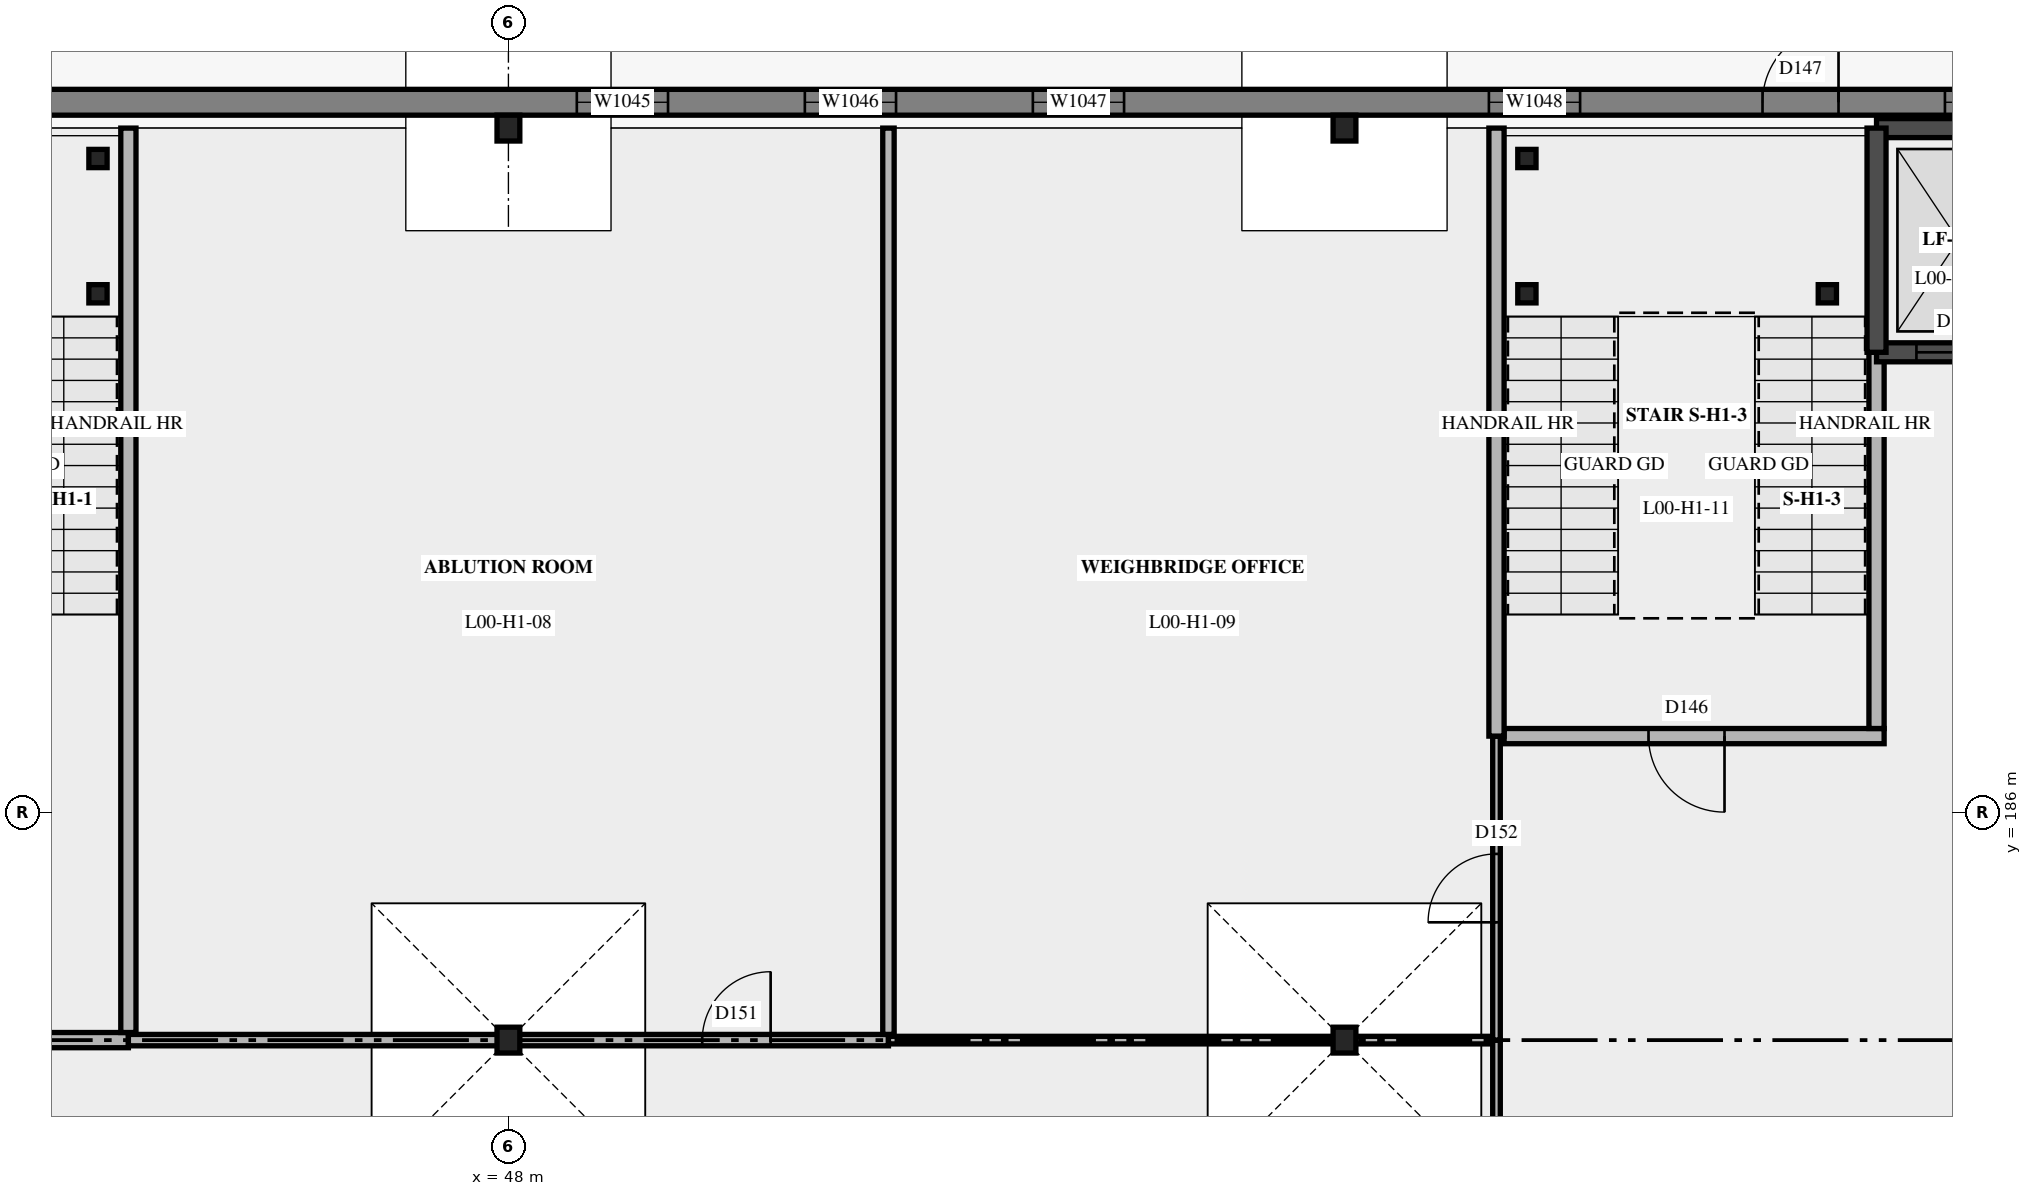
"""IFC4 building model, lengths in metres.
Left out: names, types, materials, properties, quantities, classifications, styles, units other than length and angle.
Written with IfcOpenShell. Run it as: python <this file> out.ifc"""

import sys

from ifc_helpers import new_model, si_unit, direction, frame, frame_2d, origin, origin_2d, place, context, subcontext, project, spatial, rectangle, i_section, extrude, element, fill, save


model = new_model("IFC4")
c1 = context("Model", 3, precision=1e-05, world=origin(), true_north=direction((0.0, 1.0)))
c2 = subcontext(c1, "Body", "Model", "MODEL_VIEW")
j1 = project(units=[si_unit("LENGTHUNIT", "METRE"), si_unit("PLANEANGLEUNIT", "RADIAN")], contexts=[c1])
p1 = place(None, origin())
s1 = spatial("IfcSite", under=j1, at=p1, CompositionType="ELEMENT")
p2 = place(p1, origin())
s2 = spatial("IfcBuilding", under=s1, at=p2, CompositionType="ELEMENT")
p3 = place(p2, origin())
s3 = spatial("IfcBuildingStorey", under=s2, at=p3, CompositionType="ELEMENT", Elevation=0.0)
for number, where, z_axis, x_axis in (
    (1, (48.0, 183.0, 0.0), (0.0, 0.0, 1.0), (1.0, 0.0, 0.0)),
    (2, (48.0, 195.0, 0.0), (0.0, 0.0, 1.0), (1.0, 0.0, 0.0)),
    (3, (59.0, 183.0, 0.0), (0.0, 0.0, 1.0), (1.0, 0.0, 0.0)),
    (4, (59.0, 195.0, 0.0), (0.0, 0.0, 1.0), (1.0, 0.0, 0.0)),
):
    element("IfcColumn", number, at=place(p3, frame(where, z_axis=z_axis, x_axis=x_axis)), inside=s3, PredefinedType="COLUMN", context=c2, shape_type="SweptSolid", body=[
        extrude(i_section(OverallWidth=0.3, OverallDepth=0.34, WebThickness=0.012, FlangeThickness=0.021, at=origin_2d()), origin(), (0.0, 0.0, 1.0), 4.65),
    ])
p4 = place(p3, frame((30.0, 195.34, 0.0), z_axis=(0.0, 0.0, 1.0), x_axis=(1.0, 0.0, 0.0)))
e5 = element("IfcWall", 5, at=p4, inside=s3, PredefinedType="SOLIDWALL", context=c2, shape_type="SweptSolid", body=[
    extrude(rectangle(XDim=80.0, YDim=0.34, at=frame_2d((40.0, 0.0))), origin(), (0.0, 0.0, 1.0), 5.4),
])
p5 = place(p4, frame((42.5, 0.0, 0.0)))
e6 = element("IfcOpeningElement", 6, at=p5, cuts=e5, PredefinedType="OPENING", context=c2, shape_type="SweptSolid", body=[
    extrude(rectangle(XDim=1.8, YDim=2.1, at=frame_2d((0.9, 1.05))), frame((0.0, 0.18, 0.0), z_axis=(0.0, -1.0, 0.0), x_axis=(1.0, 0.0, 0.0)), (0.0, 0.0, 1.0), 0.36),
])
p6 = place(p4, frame((34.5, 0.0, 0.0)))
e7 = element("IfcOpeningElement", 7, at=p6, cuts=e5, PredefinedType="OPENING", context=c2, shape_type="SweptSolid", body=[
    extrude(rectangle(XDim=1.0, YDim=2.1, at=frame_2d((0.5, 1.05))), frame((0.0, 0.18, 0.0), z_axis=(0.0, -1.0, 0.0), x_axis=(1.0, 0.0, 0.0)), (0.0, 0.0, 1.0), 0.36),
])
p7 = place(p4, frame((68.5, 0.0, 0.0)))
e8 = element("IfcOpeningElement", 8, at=p7, cuts=e5, PredefinedType="OPENING", context=c2, shape_type="SweptSolid", body=[
    extrude(rectangle(XDim=1.0, YDim=2.1, at=frame_2d((0.5, 1.05))), frame((0.0, 0.18, 0.0), z_axis=(0.0, -1.0, 0.0), x_axis=(1.0, 0.0, 0.0)), (0.0, 0.0, 1.0), 0.36),
])
p8 = place(p4, frame((0.9, 0.0, 0.9)))
e9 = element("IfcOpeningElement", 9, at=p8, cuts=e5, PredefinedType="OPENING", context=c2, shape_type="SweptSolid", body=[
    extrude(rectangle(XDim=1.2, YDim=3.3, at=frame_2d((0.6, 1.65))), frame((0.0, 0.18, 0.0), z_axis=(0.0, -1.0, 0.0), x_axis=(1.0, 0.0, 0.0)), (0.0, 0.0, 1.0), 0.36),
])
p9 = place(p4, frame((3.9, 0.0, 0.9)))
e10 = element("IfcOpeningElement", 10, at=p9, cuts=e5, PredefinedType="OPENING", context=c2, shape_type="SweptSolid", body=[
    extrude(rectangle(XDim=1.2, YDim=3.3, at=frame_2d((0.6, 1.65))), frame((0.0, 0.18, 0.0), z_axis=(0.0, -1.0, 0.0), x_axis=(1.0, 0.0, 0.0)), (0.0, 0.0, 1.0), 0.36),
])
p10 = place(p4, frame((18.9, 0.0, 0.9)))
e11 = element("IfcOpeningElement", 11, at=p10, cuts=e5, PredefinedType="OPENING", context=c2, shape_type="SweptSolid", body=[
    extrude(rectangle(XDim=1.2, YDim=3.3, at=frame_2d((0.6, 1.65))), frame((0.0, 0.18, 0.0), z_axis=(0.0, -1.0, 0.0), x_axis=(1.0, 0.0, 0.0)), (0.0, 0.0, 1.0), 0.36),
])
p11 = place(p4, frame((21.9, 0.0, 0.9)))
e12 = element("IfcOpeningElement", 12, at=p11, cuts=e5, PredefinedType="OPENING", context=c2, shape_type="SweptSolid", body=[
    extrude(rectangle(XDim=1.2, YDim=3.3, at=frame_2d((0.6, 1.65))), frame((0.0, 0.18, 0.0), z_axis=(0.0, -1.0, 0.0), x_axis=(1.0, 0.0, 0.0)), (0.0, 0.0, 1.0), 0.36),
])
p12 = place(p4, frame((24.9, 0.0, 0.9)))
e13 = element("IfcOpeningElement", 13, at=p12, cuts=e5, PredefinedType="OPENING", context=c2, shape_type="SweptSolid", body=[
    extrude(rectangle(XDim=1.2, YDim=3.3, at=frame_2d((0.6, 1.65))), frame((0.0, 0.18, 0.0), z_axis=(0.0, -1.0, 0.0), x_axis=(1.0, 0.0, 0.0)), (0.0, 0.0, 1.0), 0.36),
])
p13 = place(p4, frame((30.9, 0.0, 0.9)))
e14 = element("IfcOpeningElement", 14, at=p13, cuts=e5, PredefinedType="OPENING", context=c2, shape_type="SweptSolid", body=[
    extrude(rectangle(XDim=1.2, YDim=3.3, at=frame_2d((0.6, 1.65))), frame((0.0, 0.18, 0.0), z_axis=(0.0, -1.0, 0.0), x_axis=(1.0, 0.0, 0.0)), (0.0, 0.0, 1.0), 0.36),
])
p14 = place(p4, frame((36.9, 0.0, 0.9)))
e15 = element("IfcOpeningElement", 15, at=p14, cuts=e5, PredefinedType="OPENING", context=c2, shape_type="SweptSolid", body=[
    extrude(rectangle(XDim=1.2, YDim=3.3, at=frame_2d((0.6, 1.65))), frame((0.0, 0.18, 0.0), z_axis=(0.0, -1.0, 0.0), x_axis=(1.0, 0.0, 0.0)), (0.0, 0.0, 1.0), 0.36),
])
p15 = place(p4, frame((45.9, 0.0, 0.9)))
e16 = element("IfcOpeningElement", 16, at=p15, cuts=e5, PredefinedType="OPENING", context=c2, shape_type="SweptSolid", body=[
    extrude(rectangle(XDim=1.2, YDim=3.3, at=frame_2d((0.6, 1.65))), frame((0.0, 0.18, 0.0), z_axis=(0.0, -1.0, 0.0), x_axis=(1.0, 0.0, 0.0)), (0.0, 0.0, 1.0), 0.36),
])
p16 = place(p4, frame((48.9, 0.0, 0.9)))
e17 = element("IfcOpeningElement", 17, at=p16, cuts=e5, PredefinedType="OPENING", context=c2, shape_type="SweptSolid", body=[
    extrude(rectangle(XDim=1.2, YDim=3.3, at=frame_2d((0.6, 1.65))), frame((0.0, 0.18, 0.0), z_axis=(0.0, -1.0, 0.0), x_axis=(1.0, 0.0, 0.0)), (0.0, 0.0, 1.0), 0.36),
])
p17 = place(p4, frame((51.9, 0.0, 0.9)))
e18 = element("IfcOpeningElement", 18, at=p17, cuts=e5, PredefinedType="OPENING", context=c2, shape_type="SweptSolid", body=[
    extrude(rectangle(XDim=1.2, YDim=3.3, at=frame_2d((0.6, 1.65))), frame((0.0, 0.18, 0.0), z_axis=(0.0, -1.0, 0.0), x_axis=(1.0, 0.0, 0.0)), (0.0, 0.0, 1.0), 0.36),
])
p18 = place(p4, frame((54.9, 0.0, 0.9)))
e19 = element("IfcOpeningElement", 19, at=p18, cuts=e5, PredefinedType="OPENING", context=c2, shape_type="SweptSolid", body=[
    extrude(rectangle(XDim=1.2, YDim=3.3, at=frame_2d((0.6, 1.65))), frame((0.0, 0.18, 0.0), z_axis=(0.0, -1.0, 0.0), x_axis=(1.0, 0.0, 0.0)), (0.0, 0.0, 1.0), 0.36),
])
p19 = place(p4, frame((57.9, 0.0, 0.9)))
e20 = element("IfcOpeningElement", 20, at=p19, cuts=e5, PredefinedType="OPENING", context=c2, shape_type="SweptSolid", body=[
    extrude(rectangle(XDim=1.2, YDim=3.3, at=frame_2d((0.6, 1.65))), frame((0.0, 0.18, 0.0), z_axis=(0.0, -1.0, 0.0), x_axis=(1.0, 0.0, 0.0)), (0.0, 0.0, 1.0), 0.36),
])
p20 = place(p4, frame((75.9, 0.0, 0.9)))
e21 = element("IfcOpeningElement", 21, at=p20, cuts=e5, PredefinedType="OPENING", context=c2, shape_type="SweptSolid", body=[
    extrude(rectangle(XDim=1.2, YDim=3.3, at=frame_2d((0.6, 1.65))), frame((0.0, 0.18, 0.0), z_axis=(0.0, -1.0, 0.0), x_axis=(1.0, 0.0, 0.0)), (0.0, 0.0, 1.0), 0.36),
])
p21 = place(p3, frame((37.0, 183.0, 0.0), z_axis=(0.0, 0.0, 1.0), x_axis=(1.0, 0.0, 0.0)))
e22 = element("IfcWall", 22, at=p21, inside=s3, PredefinedType="PARTITIONING", context=c2, shape_type="SweptSolid", body=[
    extrude(rectangle(XDim=6.0, YDim=0.2, at=frame_2d((3.0, 0.0))), origin(), (0.0, 0.0, 1.0), 4.65),
])
p22 = place(p21, frame((2.5, 0.0, 0.0)))
e23 = element("IfcOpeningElement", 23, at=p22, cuts=e22, PredefinedType="OPENING", context=c2, shape_type="SweptSolid", body=[
    extrude(rectangle(XDim=1.0, YDim=2.1, at=frame_2d((0.5, 1.05))), frame((0.0, 0.11, 0.0), z_axis=(0.0, -1.0, 0.0), x_axis=(1.0, 0.0, 0.0)), (0.0, 0.0, 1.0), 0.22),
])
p23 = place(p3, frame((43.0, 183.0, 0.0), z_axis=(0.0, 0.0, 1.0), x_axis=(1.0, 0.0, 0.0)))
e24 = element("IfcWall", 24, at=p23, inside=s3, PredefinedType="PARTITIONING", context=c2, shape_type="SweptSolid", body=[
    extrude(rectangle(XDim=10.0, YDim=0.15, at=frame_2d((5.0, 0.0))), origin(), (0.0, 0.0, 1.0), 4.65),
])
p24 = place(p23, frame((7.55, 0.0, 0.0)))
e25 = element("IfcOpeningElement", 25, at=p24, cuts=e24, PredefinedType="OPENING", context=c2, shape_type="SweptSolid", body=[
    extrude(rectangle(XDim=0.9, YDim=2.1, at=frame_2d((0.45, 1.05))), frame((0.0, 0.085, 0.0), z_axis=(0.0, -1.0, 0.0), x_axis=(1.0, 0.0, 0.0)), (0.0, 0.0, 1.0), 0.17),
])
p25 = place(p3, frame((53.0, 183.0, 0.0), z_axis=(0.0, 0.0, 1.0), x_axis=(1.0, 0.0, 0.0)))
e26 = element("IfcWall", 26, at=p25, inside=s3, PredefinedType="PARTITIONING", context=c2, shape_type="SweptSolid", body=[
    extrude(rectangle(XDim=7.95, YDim=0.1, at=frame_2d((3.975, 0.0))), origin(), (0.0, 0.0, 1.0), 4.65),
])
p26 = place(p3, frame((61.1, 187.0, 0.0), z_axis=(0.0, 0.0, 1.0), x_axis=(1.0, 0.0, 0.0)))
e27 = element("IfcWall", 27, at=p26, inside=s3, PredefinedType="PARTITIONING", context=c2, shape_type="SweptSolid", body=[
    extrude(rectangle(XDim=5.0, YDim=0.2, at=frame_2d((2.5, 0.0))), origin(), (0.0, 0.0, 1.0), 5.15),
])
p27 = place(p26, frame((1.9, 0.0, 0.0)))
e28 = element("IfcOpeningElement", 28, at=p27, cuts=e27, PredefinedType="OPENING", context=c2, shape_type="SweptSolid", body=[
    extrude(rectangle(XDim=1.0, YDim=2.1, at=frame_2d((0.5, 1.05))), frame((0.0, 0.11, 0.0), z_axis=(0.0, -1.0, 0.0), x_axis=(1.0, 0.0, 0.0)), (0.0, 0.0, 1.0), 0.22),
])
p28 = place(p3, frame((43.0, 183.1, 0.0), z_axis=(0.0, 0.0, 1.0), x_axis=(0.0, 1.0, 0.0)))
e29 = element("IfcWall", 29, at=p28, inside=s3, PredefinedType="PARTITIONING", context=c2, shape_type="SweptSolid", body=[
    extrude(rectangle(XDim=11.9, YDim=0.2, at=frame_2d((5.95, 0.0))), origin(), (0.0, 0.0, 1.0), 5.15),
])
p29 = place(p3, frame((53.0, 183.075, 0.0), z_axis=(0.0, 0.0, 1.0), x_axis=(0.0, 1.0, 0.0)))
e30 = element("IfcWall", 30, at=p29, inside=s3, PredefinedType="PARTITIONING", context=c2, shape_type="SweptSolid", body=[
    extrude(rectangle(XDim=11.925, YDim=0.15, at=frame_2d((5.962, 0.0))), origin(), (0.0, 0.0, 1.0), 5.15),
])
p30 = place(p3, frame((61.0, 171.075, 0.0), z_axis=(0.0, 0.0, 1.0), x_axis=(0.0, 1.0, 0.0)))
e31 = element("IfcWall", 31, at=p30, inside=s3, PredefinedType="PARTITIONING", context=c2, shape_type="SweptSolid", body=[
    extrude(rectangle(XDim=11.925, YDim=0.1, at=frame_2d((5.962, 0.0))), origin(), (0.0, 0.0, 1.0), 5.15),
])
p31 = place(p30, frame((5.025, 0.0, 0.0)))
e32 = element("IfcOpeningElement", 32, at=p31, cuts=e31, PredefinedType="OPENING", context=c2, shape_type="SweptSolid", body=[
    extrude(rectangle(XDim=1.8, YDim=2.1, at=frame_2d((0.9, 1.05))), frame((0.0, 0.06, 0.0), z_axis=(0.0, -1.0, 0.0), x_axis=(1.0, 0.0, 0.0)), (0.0, 0.0, 1.0), 0.12),
])
p32 = place(p3, frame((61.0, 183.0, 0.0), z_axis=(0.0, 0.0, 1.0), x_axis=(0.0, 1.0, 0.0)))
e33 = element("IfcWall", 33, at=p32, inside=s3, PredefinedType="PARTITIONING", context=c2, shape_type="SweptSolid", body=[
    extrude(rectangle(XDim=4.0, YDim=0.1, at=frame_2d((2.0, 0.0))), origin(), (0.0, 0.0, 1.0), 5.15),
])
p33 = place(p32, frame((1.55, 0.0, 0.0)))
e34 = element("IfcOpeningElement", 34, at=p33, cuts=e33, PredefinedType="OPENING", context=c2, shape_type="SweptSolid", body=[
    extrude(rectangle(XDim=0.9, YDim=2.1, at=frame_2d((0.45, 1.05))), frame((0.0, 0.06, 0.0), z_axis=(0.0, -1.0, 0.0), x_axis=(1.0, 0.0, 0.0)), (0.0, 0.0, 1.0), 0.12),
])
p34 = place(p3, frame((61.0, 187.0, 0.0), z_axis=(0.0, 0.0, 1.0), x_axis=(0.0, 1.0, 0.0)))
e35 = element("IfcWall", 35, at=p34, inside=s3, PredefinedType="PARTITIONING", context=c2, shape_type="SweptSolid", body=[
    extrude(rectangle(XDim=8.0, YDim=0.2, at=frame_2d((4.0, 0.0))), origin(), (0.0, 0.0, 1.0), 5.15),
])
p35 = place(p3, frame((66.0, 187.1, 0.0), z_axis=(0.0, 0.0, 1.0), x_axis=(0.0, 1.0, 0.0)))
e36 = element("IfcWall", 36, at=p35, inside=s3, PredefinedType="PARTITIONING", context=c2, shape_type="SweptSolid", body=[
    extrude(rectangle(XDim=4.95, YDim=0.2, at=frame_2d((2.475, 0.0))), origin(), (0.0, 0.0, 1.0), 4.75),
])
p36 = place(p3, frame((68.15, 195.0, -1.4), z_axis=(0.0, 0.0, 1.0), x_axis=(-1.0, 0.0, 0.0)))
e37 = element("IfcWall", 37, at=p36, inside=s3, PredefinedType="SHEAR", context=c2, shape_type="SweptSolid", body=[
    extrude(rectangle(XDim=2.15, YDim=0.25, at=frame_2d((1.075, 0.0))), origin(), (0.0, 0.0, 1.0), 6.8),
])
p37 = place(p3, frame((66.0, 192.05, -1.4), z_axis=(0.0, 0.0, 1.0), x_axis=(1.0, 0.0, 0.0)))
e38 = element("IfcWall", 38, at=p37, inside=s3, PredefinedType="SHEAR", context=c2, shape_type="SweptSolid", body=[
    extrude(rectangle(XDim=2.15, YDim=0.25, at=frame_2d((1.075, 0.0))), origin(), (0.0, 0.0, 1.0), 6.8),
])
p38 = place(p37, frame((0.525, 0.0, 1.4)))
e39 = element("IfcOpeningElement", 39, at=p38, cuts=e38, PredefinedType="OPENING", context=c2, shape_type="SweptSolid", body=[
    extrude(rectangle(XDim=1.1, YDim=2.1, at=frame_2d((0.55, 1.05))), frame((0.0, 0.135, 0.0), z_axis=(0.0, -1.0, 0.0), x_axis=(1.0, 0.0, 0.0)), (0.0, 0.0, 1.0), 0.27),
])
p39 = place(p3, frame((66.0, 195.0, -1.4), z_axis=(0.0, 0.0, 1.0), x_axis=(0.0, -1.0, 0.0)))
e40 = element("IfcWall", 40, at=p39, inside=s3, PredefinedType="SHEAR", context=c2, shape_type="SweptSolid", body=[
    extrude(rectangle(XDim=2.95, YDim=0.25, at=frame_2d((1.475, 0.0))), origin(), (0.0, 0.0, 1.0), 6.8),
])
for number, where, z_axis, x_axis in (
    (41, (42.6, 192.82, 0.0), (0.0, 0.0, 1.0), (1.0, 0.0, 0.0)),
    (42, (42.6, 194.6, 0.0), (0.0, 0.0, 1.0), (1.0, 0.0, 0.0)),
    (43, (61.4, 192.82, 0.0), (0.0, 0.0, 1.0), (1.0, 0.0, 0.0)),
    (44, (61.4, 194.6, 0.0), (0.0, 0.0, 1.0), (1.0, 0.0, 0.0)),
    (45, (65.353, 192.82, 0.0), (0.0, 0.0, 1.0), (1.0, 0.0, 0.0)),
):
    element("IfcColumn", number, at=place(p3, frame(where, z_axis=z_axis, x_axis=x_axis)), inside=s3, PredefinedType="COLUMN", context=c2, shape_type="SweptSolid", body=[
        extrude(i_section(OverallWidth=0.24, OverallDepth=0.24, WebThickness=0.01, FlangeThickness=0.017, at=origin_2d()), origin(), (0.0, 0.0, 1.0), 2.5),
    ])
p40 = place(p6, origin())
e46 = element("IfcDoor", 46, at=p40, inside=s3, OperationType="SINGLE_SWING_RIGHT", PredefinedType="DOOR", context=c2, shape_type="SweptSolid", body=[
    extrude(rectangle(XDim=1.0, YDim=2.1, at=frame_2d((0.5, 1.05))), frame((0.0, 0.025, 0.0), z_axis=(0.0, -1.0, 0.0), x_axis=(1.0, 0.0, 0.0)), (0.0, 0.0, 1.0), 0.05),
])
fill(e7, e46)
p41 = place(p10, origin())
e47 = element("IfcWindow", 47, at=p41, inside=s3, PartitioningType="SINGLE_PANEL", PredefinedType="WINDOW", context=c2, shape_type="SweptSolid", body=[
    extrude(rectangle(XDim=1.2, YDim=3.3, at=frame_2d((0.6, 1.65))), frame((0.0, 0.03, 0.0), z_axis=(0.0, -1.0, 0.0), x_axis=(1.0, 0.0, 0.0)), (0.0, 0.0, 1.0), 0.06),
])
fill(e11, e47)
p42 = place(p11, origin())
e48 = element("IfcWindow", 48, at=p42, inside=s3, PartitioningType="SINGLE_PANEL", PredefinedType="WINDOW", context=c2, shape_type="SweptSolid", body=[
    extrude(rectangle(XDim=1.2, YDim=3.3, at=frame_2d((0.6, 1.65))), frame((0.0, 0.03, 0.0), z_axis=(0.0, -1.0, 0.0), x_axis=(1.0, 0.0, 0.0)), (0.0, 0.0, 1.0), 0.06),
])
fill(e12, e48)
p43 = place(p12, origin())
e49 = element("IfcWindow", 49, at=p43, inside=s3, PartitioningType="SINGLE_PANEL", PredefinedType="WINDOW", context=c2, shape_type="SweptSolid", body=[
    extrude(rectangle(XDim=1.2, YDim=3.3, at=frame_2d((0.6, 1.65))), frame((0.0, 0.03, 0.0), z_axis=(0.0, -1.0, 0.0), x_axis=(1.0, 0.0, 0.0)), (0.0, 0.0, 1.0), 0.06),
])
fill(e13, e49)
p44 = place(p13, origin())
e50 = element("IfcWindow", 50, at=p44, inside=s3, PartitioningType="SINGLE_PANEL", PredefinedType="WINDOW", context=c2, shape_type="SweptSolid", body=[
    extrude(rectangle(XDim=1.2, YDim=3.3, at=frame_2d((0.6, 1.65))), frame((0.0, 0.03, 0.0), z_axis=(0.0, -1.0, 0.0), x_axis=(1.0, 0.0, 0.0)), (0.0, 0.0, 1.0), 0.06),
])
fill(e14, e50)
p45 = place(p14, origin())
e51 = element("IfcWindow", 51, at=p45, inside=s3, PartitioningType="SINGLE_PANEL", PredefinedType="WINDOW", context=c2, shape_type="SweptSolid", body=[
    extrude(rectangle(XDim=1.2, YDim=3.3, at=frame_2d((0.6, 1.65))), frame((0.0, 0.03, 0.0), z_axis=(0.0, -1.0, 0.0), x_axis=(1.0, 0.0, 0.0)), (0.0, 0.0, 1.0), 0.06),
])
fill(e15, e51)
p46 = place(p27, origin())
e52 = element("IfcDoor", 52, at=p46, inside=s3, OperationType="SINGLE_SWING_LEFT", PredefinedType="DOOR", context=c2, shape_type="SweptSolid", body=[
    extrude(rectangle(XDim=1.0, YDim=2.1, at=frame_2d((0.5, 1.05))), frame((0.0, 0.025, 0.0), z_axis=(0.0, -1.0, 0.0), x_axis=(1.0, 0.0, 0.0)), (0.0, 0.0, 1.0), 0.05),
])
fill(e28, e52)
p47 = place(p24, origin())
e53 = element("IfcDoor", 53, at=p47, inside=s3, OperationType="SINGLE_SWING_RIGHT", PredefinedType="DOOR", context=c2, shape_type="SweptSolid", body=[
    extrude(rectangle(XDim=0.9, YDim=2.1, at=frame_2d((0.45, 1.05))), frame((0.0, 0.025, 0.0), z_axis=(0.0, -1.0, 0.0), x_axis=(1.0, 0.0, 0.0)), (0.0, 0.0, 1.0), 0.05),
])
fill(e25, e53)
p48 = place(p33, origin())
e54 = element("IfcDoor", 54, at=p48, inside=s3, OperationType="SINGLE_SWING_LEFT", PredefinedType="DOOR", context=c2, shape_type="SweptSolid", body=[
    extrude(rectangle(XDim=0.9, YDim=2.1, at=frame_2d((0.45, 1.05))), frame((0.0, 0.025, 0.0), z_axis=(0.0, -1.0, 0.0), x_axis=(1.0, 0.0, 0.0)), (0.0, 0.0, 1.0), 0.05),
])
fill(e34, e54)
p49 = place(p38, origin())
e55 = element("IfcDoor", 55, at=p49, inside=s3, OperationType="SLIDING_TO_LEFT", PredefinedType="DOOR", context=c2, shape_type="SweptSolid", body=[
    extrude(rectangle(XDim=1.1, YDim=2.1, at=frame_2d((0.55, 1.05))), frame((0.0, 0.025, 0.0), z_axis=(0.0, -1.0, 0.0), x_axis=(1.0, 0.0, 0.0)), (0.0, 0.0, 1.0), 0.05),
])
fill(e39, e55)
save(model, sys.argv[1])
